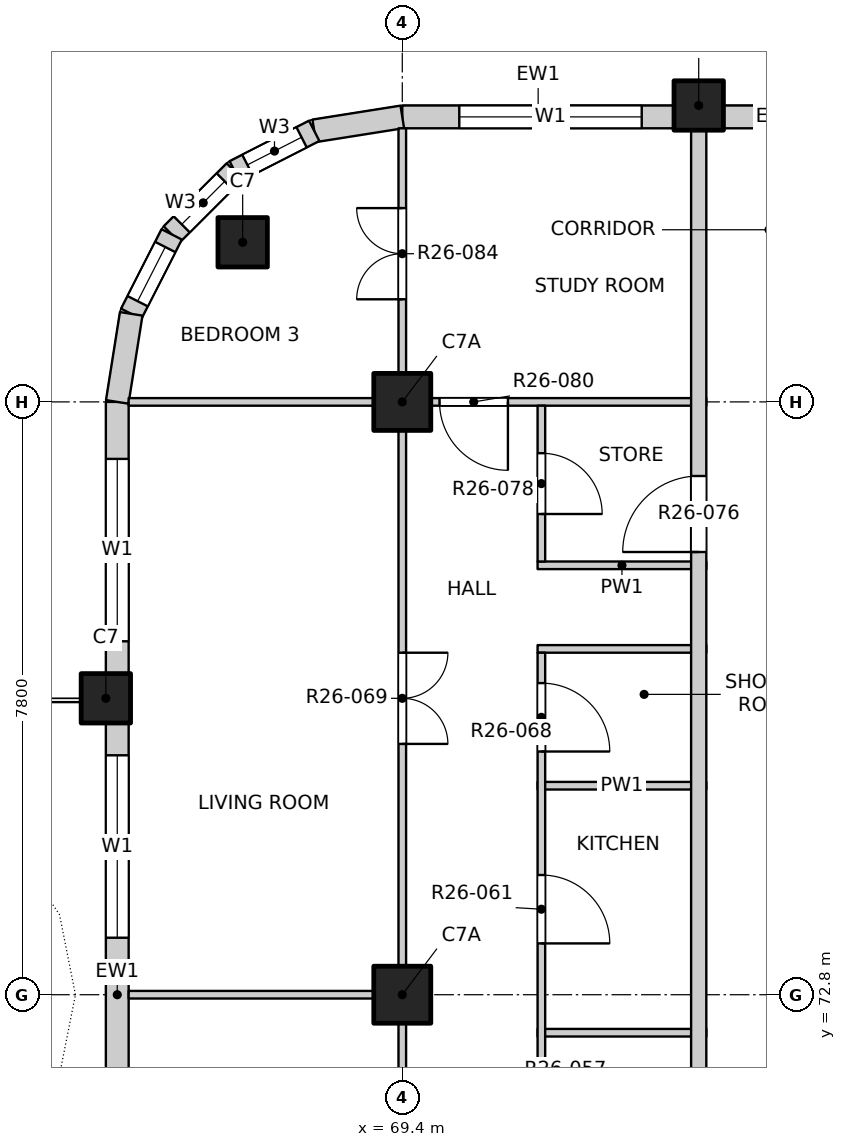
"""IFC4 building model, lengths in metres.
Left out: names, types, materials, properties, quantities, classifications, styles, units other than length and angle.
Written with IfcOpenShell. Run it as: python <this file> out.ifc"""

import sys

from ifc_helpers import new_model, si_unit, direction, frame, frame_2d, origin, origin_2d, place, context, subcontext, project, spatial, rectangle, extrude, element, fill, save


model = new_model("IFC4")
c1 = context("Model", 3, precision=1e-05, world=origin(), true_north=direction((0.0, 1.0)))
c2 = subcontext(c1, "Body", "Model", "MODEL_VIEW")
j1 = project(units=[si_unit("LENGTHUNIT", "METRE"), si_unit("PLANEANGLEUNIT", "RADIAN")], contexts=[c1])
p1 = place(None, origin())
s1 = spatial("IfcSite", under=j1, at=p1, CompositionType="ELEMENT")
p2 = place(p1, origin())
s2 = spatial("IfcBuilding", under=s1, at=p2, CompositionType="ELEMENT")
p3 = place(p2, frame((0.0, 0.0, 259.6)))
s3 = spatial("IfcBuildingStorey", under=s2, at=p3, CompositionType="ELEMENT", Elevation=259.6)
for number, where, z_axis, x_axis in (
    (1, (67.3, 82.7, -0.25), (0.0, 0.0, 1.0), (1.0, 0.0, 0.0)),
    (2, (73.3, 84.5, -0.25), (0.0, 0.0, 1.0), (1.0, 0.0, 0.0)),
    (3, (65.5, 76.7, -0.25), (0.0, 0.0, 1.0), (1.0, 0.0, 0.0)),
):
    element("IfcColumn", number, at=place(p3, frame(where, z_axis=z_axis, x_axis=x_axis)), inside=s3, PredefinedType="COLUMN", context=c2, shape_type="SweptSolid", body=[
        extrude(rectangle(XDim=0.65, YDim=0.65, at=origin_2d()), origin(), (0.0, 0.0, 1.0), 3.4),
    ])
for number, where, z_axis, x_axis in (
    (4, (69.4, 72.8, -0.25), (0.0, 0.0, 1.0), (1.0, 0.0, 0.0)),
    (5, (69.4, 80.6, -0.25), (0.0, 0.0, 1.0), (1.0, 0.0, 0.0)),
):
    element("IfcColumn", number, at=place(p3, frame(where, z_axis=z_axis, x_axis=x_axis)), inside=s3, PredefinedType="COLUMN", context=c2, shape_type="SweptSolid", body=[
        extrude(rectangle(XDim=0.75, YDim=0.75, at=origin_2d()), origin(), (0.0, 0.0, 1.0), 3.4),
    ])
p4 = place(p3, frame((69.4, 84.35, 0.0), z_axis=(0.0, 0.0, 1.0), x_axis=(1.0, 0.0, 0.0)))
e6 = element("IfcWall", 6, at=p4, inside=s3, PredefinedType="SOLIDWALL", context=c2, shape_type="SweptSolid", body=[
    extrude(rectangle(XDim=3.575, YDim=0.3, at=frame_2d((1.788, 0.0))), origin(), (0.0, 0.0, 1.0), 3.15),
])
p5 = place(p4, frame((0.75, 0.0, 0.9)))
e7 = element("IfcOpeningElement", 7, at=p5, cuts=e6, PredefinedType="OPENING", context=c2, shape_type="SweptSolid", body=[
    extrude(rectangle(XDim=2.4, YDim=1.8, at=frame_2d((1.2, 0.9))), frame((0.0, 0.16, 0.0), z_axis=(0.0, -1.0, 0.0), x_axis=(1.0, 0.0, 0.0)), (0.0, 0.0, 1.0), 0.32),
])
p6 = place(p3, frame((73.625, 84.35, 0.0), z_axis=(0.0, 0.0, 1.0), x_axis=(1.0, 0.0, 0.0)))
e8 = element("IfcWall", 8, at=p6, inside=s3, PredefinedType="SOLIDWALL", context=c2, shape_type="SweptSolid", body=[
    extrude(rectangle(XDim=1.425, YDim=0.3, at=frame_2d((0.712, 0.0))), origin(), (0.0, 0.0, 1.0), 3.15),
])
p7 = place(p3, frame((65.65, 69.225, 0.0), z_axis=(0.0, 0.0, 1.0), x_axis=(0.0, 1.0, 0.0)))
e9 = element("IfcWall", 9, at=p7, inside=s3, PredefinedType="SOLIDWALL", context=c2, shape_type="SweptSolid", body=[
    extrude(rectangle(XDim=7.15, YDim=0.3, at=frame_2d((3.575, 0.0))), origin(), (0.0, 0.0, 1.0), 3.15),
])
p8 = place(p7, frame((0.725, 0.0, 0.0)))
e10 = element("IfcOpeningElement", 10, at=p8, cuts=e9, PredefinedType="OPENING", context=c2, shape_type="SweptSolid", body=[
    extrude(rectangle(XDim=1.8, YDim=2.4, at=frame_2d((0.9, 1.2))), frame((0.0, 0.16, 0.0), z_axis=(0.0, -1.0, 0.0), x_axis=(1.0, 0.0, 0.0)), (0.0, 0.0, 1.0), 0.32),
])
p9 = place(p7, frame((4.325, 0.0, 0.9)))
e11 = element("IfcOpeningElement", 11, at=p9, cuts=e9, PredefinedType="OPENING", context=c2, shape_type="SweptSolid", body=[
    extrude(rectangle(XDim=2.4, YDim=1.8, at=frame_2d((1.2, 0.9))), frame((0.0, 0.16, 0.0), z_axis=(0.0, -1.0, 0.0), x_axis=(1.0, 0.0, 0.0)), (0.0, 0.0, 1.0), 0.32),
])
p10 = place(p3, frame((65.65, 77.025, 0.0), z_axis=(0.0, 0.0, 1.0), x_axis=(0.0, 1.0, 0.0)))
e12 = element("IfcWall", 12, at=p10, inside=s3, PredefinedType="SOLIDWALL", context=c2, shape_type="SweptSolid", body=[
    extrude(rectangle(XDim=3.575, YDim=0.3, at=frame_2d((1.788, 0.0))), origin(), (0.0, 0.0, 1.0), 3.15),
])
p11 = place(p10, frame((0.425, 0.0, 0.9)))
e13 = element("IfcOpeningElement", 13, at=p11, cuts=e12, PredefinedType="OPENING", context=c2, shape_type="SweptSolid", body=[
    extrude(rectangle(XDim=2.4, YDim=1.8, at=frame_2d((1.2, 0.9))), frame((0.0, 0.16, 0.0), z_axis=(0.0, -1.0, 0.0), x_axis=(1.0, 0.0, 0.0)), (0.0, 0.0, 1.0), 0.32),
])
p12 = place(p3, frame((69.4, 84.35, 0.0), z_axis=(0.0, 0.0, 1.0), x_axis=(-0.987678452879, -0.156496880861, 0.0)))
e14 = element("IfcWall", 14, at=p12, inside=s3, PredefinedType="SOLIDWALL", context=c2, shape_type="SweptSolid", body=[
    extrude(rectangle(XDim=1.173, YDim=0.3, at=frame_2d((0.586, 0.0))), origin(), (0.0, 0.0, 1.0), 3.15),
])
p13 = place(p3, frame((68.241, 84.167, 0.0), z_axis=(0.0, 0.0, 1.0), x_axis=(-0.890988677504, -0.454025524128, 0.0)))
e15 = element("IfcWall", 15, at=p13, inside=s3, PredefinedType="SOLIDWALL", context=c2, shape_type="SweptSolid", body=[
    extrude(rectangle(XDim=1.173, YDim=0.3, at=frame_2d((0.587, 0.0))), origin(), (0.0, 0.0, 1.0), 3.15),
])
p14 = place(p13, frame((0.187, 0.0, 0.9)))
e16 = element("IfcOpeningElement", 16, at=p14, cuts=e15, PredefinedType="OPENING", context=c2, shape_type="SweptSolid", body=[
    extrude(rectangle(XDim=0.8, YDim=1.2, at=frame_2d((0.4, 0.6))), frame((0.0, 0.16, 0.0), z_axis=(0.0, -1.0, 0.0), x_axis=(1.0, 0.0, 0.0)), (0.0, 0.0, 1.0), 0.32),
])
p15 = place(p3, frame((67.196, 83.634, 0.0), z_axis=(0.0, 0.0, 1.0), x_axis=(-0.707106781187, -0.707106781187, 0.0)))
e17 = element("IfcWall", 17, at=p15, inside=s3, PredefinedType="SOLIDWALL", context=c2, shape_type="SweptSolid", body=[
    extrude(rectangle(XDim=1.173, YDim=0.3, at=frame_2d((0.586, 0.0))), origin(), (0.0, 0.0, 1.0), 3.15),
])
p16 = place(p15, frame((0.187, 0.0, 0.9)))
e18 = element("IfcOpeningElement", 18, at=p16, cuts=e17, PredefinedType="OPENING", context=c2, shape_type="SweptSolid", body=[
    extrude(rectangle(XDim=0.8, YDim=1.2, at=frame_2d((0.4, 0.6))), frame((0.0, 0.16, 0.0), z_axis=(0.0, -1.0, 0.0), x_axis=(1.0, 0.0, 0.0)), (0.0, 0.0, 1.0), 0.32),
])
p17 = place(p3, frame((66.366, 82.804, 0.0), z_axis=(0.0, 0.0, 1.0), x_axis=(-0.454025524128, -0.890988677504, 0.0)))
e19 = element("IfcWall", 19, at=p17, inside=s3, PredefinedType="SOLIDWALL", context=c2, shape_type="SweptSolid", body=[
    extrude(rectangle(XDim=1.173, YDim=0.3, at=frame_2d((0.587, 0.0))), origin(), (0.0, 0.0, 1.0), 3.15),
])
p18 = place(p17, frame((0.187, 0.0, 0.9)))
e20 = element("IfcOpeningElement", 20, at=p18, cuts=e19, PredefinedType="OPENING", context=c2, shape_type="SweptSolid", body=[
    extrude(rectangle(XDim=0.8, YDim=1.2, at=frame_2d((0.4, 0.6))), frame((0.0, 0.16, 0.0), z_axis=(0.0, -1.0, 0.0), x_axis=(1.0, 0.0, 0.0)), (0.0, 0.0, 1.0), 0.32),
])
p19 = place(p3, frame((65.833, 81.759, 0.0), z_axis=(0.0, 0.0, 1.0), x_axis=(-0.156496880861, -0.987678452879, 0.0)))
e21 = element("IfcWall", 21, at=p19, inside=s3, PredefinedType="SOLIDWALL", context=c2, shape_type="SweptSolid", body=[
    extrude(rectangle(XDim=1.173, YDim=0.3, at=frame_2d((0.586, 0.0))), origin(), (0.0, 0.0, 1.0), 3.15),
])
p20 = place(p3, frame((71.18, 72.3, 0.0), z_axis=(0.0, 0.0, 1.0), x_axis=(1.0, 0.0, 0.0)))
e22 = element("IfcWall", 22, at=p20, inside=s3, PredefinedType="PARTITIONING", context=c2, shape_type="SweptSolid", body=[
    extrude(rectangle(XDim=2.22, YDim=0.1, at=frame_2d((1.11, 0.0))), origin(), (0.0, 0.0, 1.0), 3.15),
])
p21 = place(p3, frame((65.8, 72.8, 0.0), z_axis=(0.0, 0.0, 1.0), x_axis=(1.0, 0.0, 0.0)))
e23 = element("IfcWall", 23, at=p21, inside=s3, PredefinedType="PARTITIONING", context=c2, shape_type="SweptSolid", body=[
    extrude(rectangle(XDim=3.65, YDim=0.1, at=frame_2d((1.825, 0.0))), origin(), (0.0, 0.0, 1.0), 3.15),
])
for number, where, z_axis, x_axis in (
    (24, (71.18, 75.55, 0.0), (0.0, 0.0, 1.0), (1.0, 0.0, 0.0)),
    (25, (71.18, 77.35, 0.0), (0.0, 0.0, 1.0), (1.0, 0.0, 0.0)),
    (26, (71.18, 78.45, 0.0), (0.0, 0.0, 1.0), (1.0, 0.0, 0.0)),
):
    element("IfcWall", number, at=place(p3, frame(where, z_axis=z_axis, x_axis=x_axis)), inside=s3, PredefinedType="PARTITIONING", context=c2, shape_type="SweptSolid", body=[
        extrude(rectangle(XDim=2.22, YDim=0.1, at=frame_2d((1.11, 0.0))), origin(), (0.0, 0.0, 1.0), 3.15),
    ])
p22 = place(p3, frame((65.8, 80.6, 0.0), z_axis=(0.0, 0.0, 1.0), x_axis=(1.0, 0.0, 0.0)))
e27 = element("IfcWall", 27, at=p22, inside=s3, PredefinedType="PARTITIONING", context=c2, shape_type="SweptSolid", body=[
    extrude(rectangle(XDim=7.6, YDim=0.1, at=frame_2d((3.8, 0.0))), origin(), (0.0, 0.0, 1.0), 3.15),
])
p23 = place(p22, frame((4.09, 0.0, 0.0)))
e28 = element("IfcOpeningElement", 28, at=p23, cuts=e27, PredefinedType="OPENING", context=c2, shape_type="SweptSolid", body=[
    extrude(rectangle(XDim=0.9, YDim=2.1, at=frame_2d((0.45, 1.05))), frame((0.0, 0.06, 0.0), z_axis=(0.0, -1.0, 0.0), x_axis=(1.0, 0.0, 0.0)), (0.0, 0.0, 1.0), 0.12),
])
p24 = place(p3, frame((69.4, 45.8, 0.0), z_axis=(0.0, 0.0, 1.0), x_axis=(0.0, 1.0, 0.0)))
e29 = element("IfcWall", 29, at=p24, inside=s3, PredefinedType="PARTITIONING", context=c2, shape_type="SweptSolid", body=[
    extrude(rectangle(XDim=38.4, YDim=0.1, at=frame_2d((19.2, 0.0))), origin(), (0.0, 0.0, 1.0), 3.15),
])
p25 = place(p24, frame((1.05, 0.0, 0.0)))
e30 = element("IfcOpeningElement", 30, at=p25, cuts=e29, PredefinedType="OPENING", context=c2, shape_type="SweptSolid", body=[
    extrude(rectangle(XDim=1.2, YDim=2.1, at=frame_2d((0.6, 1.05))), frame((0.0, 0.06, 0.0), z_axis=(0.0, -1.0, 0.0), x_axis=(1.0, 0.0, 0.0)), (0.0, 0.0, 1.0), 0.12),
])
p26 = place(p24, frame((5.1, 0.0, 0.0)))
e31 = element("IfcOpeningElement", 31, at=p26, cuts=e29, PredefinedType="OPENING", context=c2, shape_type="SweptSolid", body=[
    extrude(rectangle(XDim=0.9, YDim=2.1, at=frame_2d((0.45, 1.05))), frame((0.0, 0.06, 0.0), z_axis=(0.0, -1.0, 0.0), x_axis=(1.0, 0.0, 0.0)), (0.0, 0.0, 1.0), 0.12),
])
p27 = place(p24, frame((9.0, 0.0, 0.0)))
e32 = element("IfcOpeningElement", 32, at=p27, cuts=e29, PredefinedType="OPENING", context=c2, shape_type="SweptSolid", body=[
    extrude(rectangle(XDim=0.9, YDim=2.1, at=frame_2d((0.45, 1.05))), frame((0.0, 0.06, 0.0), z_axis=(0.0, -1.0, 0.0), x_axis=(1.0, 0.0, 0.0)), (0.0, 0.0, 1.0), 0.12),
])
p28 = place(p24, frame((12.9, 0.0, 0.0)))
e33 = element("IfcOpeningElement", 33, at=p28, cuts=e29, PredefinedType="OPENING", context=c2, shape_type="SweptSolid", body=[
    extrude(rectangle(XDim=0.9, YDim=2.1, at=frame_2d((0.45, 1.05))), frame((0.0, 0.06, 0.0), z_axis=(0.0, -1.0, 0.0), x_axis=(1.0, 0.0, 0.0)), (0.0, 0.0, 1.0), 0.12),
])
p29 = place(p24, frame((16.8, 0.0, 0.0)))
e34 = element("IfcOpeningElement", 34, at=p29, cuts=e29, PredefinedType="OPENING", context=c2, shape_type="SweptSolid", body=[
    extrude(rectangle(XDim=0.9, YDim=2.1, at=frame_2d((0.45, 1.05))), frame((0.0, 0.06, 0.0), z_axis=(0.0, -1.0, 0.0), x_axis=(1.0, 0.0, 0.0)), (0.0, 0.0, 1.0), 0.12),
])
p30 = place(p24, frame((20.7, 0.0, 0.0)))
e35 = element("IfcOpeningElement", 35, at=p30, cuts=e29, PredefinedType="OPENING", context=c2, shape_type="SweptSolid", body=[
    extrude(rectangle(XDim=0.9, YDim=2.1, at=frame_2d((0.45, 1.05))), frame((0.0, 0.06, 0.0), z_axis=(0.0, -1.0, 0.0), x_axis=(1.0, 0.0, 0.0)), (0.0, 0.0, 1.0), 0.12),
])
p31 = place(p24, frame((24.6, 0.0, 0.0)))
e36 = element("IfcOpeningElement", 36, at=p31, cuts=e29, PredefinedType="OPENING", context=c2, shape_type="SweptSolid", body=[
    extrude(rectangle(XDim=0.9, YDim=2.1, at=frame_2d((0.45, 1.05))), frame((0.0, 0.06, 0.0), z_axis=(0.0, -1.0, 0.0), x_axis=(1.0, 0.0, 0.0)), (0.0, 0.0, 1.0), 0.12),
])
p32 = place(p24, frame((30.3, 0.0, 0.0)))
e37 = element("IfcOpeningElement", 37, at=p32, cuts=e29, PredefinedType="OPENING", context=c2, shape_type="SweptSolid", body=[
    extrude(rectangle(XDim=1.2, YDim=2.1, at=frame_2d((0.6, 1.05))), frame((0.0, 0.06, 0.0), z_axis=(0.0, -1.0, 0.0), x_axis=(1.0, 0.0, 0.0)), (0.0, 0.0, 1.0), 0.12),
])
p33 = place(p24, frame((36.15, 0.0, 0.0)))
e38 = element("IfcOpeningElement", 38, at=p33, cuts=e29, PredefinedType="OPENING", context=c2, shape_type="SweptSolid", body=[
    extrude(rectangle(XDim=1.2, YDim=2.1, at=frame_2d((0.6, 1.05))), frame((0.0, 0.06, 0.0), z_axis=(0.0, -1.0, 0.0), x_axis=(1.0, 0.0, 0.0)), (0.0, 0.0, 1.0), 0.12),
])
p34 = place(p3, frame((71.23, 60.65, 0.0), z_axis=(0.0, 0.0, 1.0), x_axis=(0.0, 1.0, 0.0)))
e39 = element("IfcWall", 39, at=p34, inside=s3, PredefinedType="PARTITIONING", context=c2, shape_type="SweptSolid", body=[
    extrude(rectangle(XDim=16.65, YDim=0.1, at=frame_2d((8.325, 0.0))), origin(), (0.0, 0.0, 1.0), 3.15),
])
p35 = place(p34, frame((0.625, 0.0, 0.0)))
e40 = element("IfcOpeningElement", 40, at=p35, cuts=e39, PredefinedType="OPENING", context=c2, shape_type="SweptSolid", body=[
    extrude(rectangle(XDim=0.8, YDim=2.1, at=frame_2d((0.4, 1.05))), frame((0.0, 0.06, 0.0), z_axis=(0.0, -1.0, 0.0), x_axis=(1.0, 0.0, 0.0)), (0.0, 0.0, 1.0), 0.12),
])
p36 = place(p34, frame((2.825, 0.0, 0.0)))
e41 = element("IfcOpeningElement", 41, at=p36, cuts=e39, PredefinedType="OPENING", context=c2, shape_type="SweptSolid", body=[
    extrude(rectangle(XDim=0.8, YDim=2.1, at=frame_2d((0.4, 1.05))), frame((0.0, 0.06, 0.0), z_axis=(0.0, -1.0, 0.0), x_axis=(1.0, 0.0, 0.0)), (0.0, 0.0, 1.0), 0.12),
])
p37 = place(p34, frame((5.25, 0.0, 0.0)))
e42 = element("IfcOpeningElement", 42, at=p37, cuts=e39, PredefinedType="OPENING", context=c2, shape_type="SweptSolid", body=[
    extrude(rectangle(XDim=0.8, YDim=2.1, at=frame_2d((0.4, 1.05))), frame((0.0, 0.06, 0.0), z_axis=(0.0, -1.0, 0.0), x_axis=(1.0, 0.0, 0.0)), (0.0, 0.0, 1.0), 0.12),
])
p38 = place(p34, frame((7.7, 0.0, 0.0)))
e43 = element("IfcOpeningElement", 43, at=p38, cuts=e39, PredefinedType="OPENING", context=c2, shape_type="SweptSolid", body=[
    extrude(rectangle(XDim=0.8, YDim=2.1, at=frame_2d((0.4, 1.05))), frame((0.0, 0.06, 0.0), z_axis=(0.0, -1.0, 0.0), x_axis=(1.0, 0.0, 0.0)), (0.0, 0.0, 1.0), 0.12),
])
p39 = place(p34, frame((10.0, 0.0, 0.0)))
e44 = element("IfcOpeningElement", 44, at=p39, cuts=e39, PredefinedType="OPENING", context=c2, shape_type="SweptSolid", body=[
    extrude(rectangle(XDim=0.9, YDim=2.1, at=frame_2d((0.45, 1.05))), frame((0.0, 0.06, 0.0), z_axis=(0.0, -1.0, 0.0), x_axis=(1.0, 0.0, 0.0)), (0.0, 0.0, 1.0), 0.12),
])
p40 = place(p34, frame((12.825, 0.0, 0.0)))
e45 = element("IfcOpeningElement", 45, at=p40, cuts=e39, PredefinedType="OPENING", context=c2, shape_type="SweptSolid", body=[
    extrude(rectangle(XDim=0.9, YDim=2.1, at=frame_2d((0.45, 1.05))), frame((0.0, 0.06, 0.0), z_axis=(0.0, -1.0, 0.0), x_axis=(1.0, 0.0, 0.0)), (0.0, 0.0, 1.0), 0.12),
])
p41 = place(p34, frame((15.35, 0.0, 0.0)))
e46 = element("IfcOpeningElement", 46, at=p41, cuts=e39, PredefinedType="OPENING", context=c2, shape_type="SweptSolid", body=[
    extrude(rectangle(XDim=0.9, YDim=2.1, at=frame_2d((0.45, 1.05))), frame((0.0, 0.06, 0.0), z_axis=(0.0, -1.0, 0.0), x_axis=(1.0, 0.0, 0.0)), (0.0, 0.0, 1.0), 0.12),
])
p42 = place(p3, frame((71.23, 78.5, 0.0), z_axis=(0.0, 0.0, 1.0), x_axis=(0.0, 1.0, 0.0)))
e47 = element("IfcWall", 47, at=p42, inside=s3, PredefinedType="PARTITIONING", context=c2, shape_type="SweptSolid", body=[
    extrude(rectangle(XDim=2.05, YDim=0.1, at=frame_2d((1.025, 0.0))), origin(), (0.0, 0.0, 1.0), 3.15),
])
p43 = place(p42, frame((0.625, 0.0, 0.0)))
e48 = element("IfcOpeningElement", 48, at=p43, cuts=e47, PredefinedType="OPENING", context=c2, shape_type="SweptSolid", body=[
    extrude(rectangle(XDim=0.8, YDim=2.1, at=frame_2d((0.4, 1.05))), frame((0.0, 0.06, 0.0), z_axis=(0.0, -1.0, 0.0), x_axis=(1.0, 0.0, 0.0)), (0.0, 0.0, 1.0), 0.12),
])
p44 = place(p3, frame((73.3, 49.5, 0.0), z_axis=(0.0, 0.0, 1.0), x_axis=(0.0, 1.0, 0.0)))
e49 = element("IfcWall", 49, at=p44, inside=s3, PredefinedType="PARTITIONING", context=c2, shape_type="SweptSolid", body=[
    extrude(rectangle(XDim=34.7, YDim=0.2, at=frame_2d((17.35, 0.0))), origin(), (0.0, 0.0, 1.0), 3.15),
])
p45 = place(p44, frame((11.275, 0.0, 0.0)))
e50 = element("IfcOpeningElement", 50, at=p45, cuts=e49, PredefinedType="OPENING", context=c2, shape_type="SweptSolid", body=[
    extrude(rectangle(XDim=1.0, YDim=2.1, at=frame_2d((0.5, 1.05))), frame((0.0, 0.11, 0.0), z_axis=(0.0, -1.0, 0.0), x_axis=(1.0, 0.0, 0.0)), (0.0, 0.0, 1.0), 0.22),
])
p46 = place(p44, frame((29.125, 0.0, 0.0)))
e51 = element("IfcOpeningElement", 51, at=p46, cuts=e49, PredefinedType="OPENING", context=c2, shape_type="SweptSolid", body=[
    extrude(rectangle(XDim=1.0, YDim=2.1, at=frame_2d((0.5, 1.05))), frame((0.0, 0.11, 0.0), z_axis=(0.0, -1.0, 0.0), x_axis=(1.0, 0.0, 0.0)), (0.0, 0.0, 1.0), 0.22),
])
p47 = place(p5, origin())
e52 = element("IfcWindow", 52, at=p47, inside=s3, PartitioningType="DOUBLE_PANEL_VERTICAL", PredefinedType="WINDOW", context=c2, shape_type="SweptSolid", body=[
    extrude(rectangle(XDim=2.4, YDim=1.8, at=frame_2d((1.2, 0.9))), frame((0.0, 0.03, 0.0), z_axis=(0.0, -1.0, 0.0), x_axis=(1.0, 0.0, 0.0)), (0.0, 0.0, 1.0), 0.06),
])
fill(e7, e52)
p48 = place(p9, origin())
e53 = element("IfcWindow", 53, at=p48, inside=s3, PartitioningType="DOUBLE_PANEL_VERTICAL", PredefinedType="WINDOW", context=c2, shape_type="SweptSolid", body=[
    extrude(rectangle(XDim=2.4, YDim=1.8, at=frame_2d((1.2, 0.9))), frame((0.0, 0.03, 0.0), z_axis=(0.0, -1.0, 0.0), x_axis=(1.0, 0.0, 0.0)), (0.0, 0.0, 1.0), 0.06),
])
fill(e11, e53)
p49 = place(p11, origin())
e54 = element("IfcWindow", 54, at=p49, inside=s3, PartitioningType="DOUBLE_PANEL_VERTICAL", PredefinedType="WINDOW", context=c2, shape_type="SweptSolid", body=[
    extrude(rectangle(XDim=2.4, YDim=1.8, at=frame_2d((1.2, 0.9))), frame((0.0, 0.03, 0.0), z_axis=(0.0, -1.0, 0.0), x_axis=(1.0, 0.0, 0.0)), (0.0, 0.0, 1.0), 0.06),
])
fill(e13, e54)
p50 = place(p14, origin())
e55 = element("IfcWindow", 55, at=p50, inside=s3, PartitioningType="SINGLE_PANEL", PredefinedType="WINDOW", context=c2, shape_type="SweptSolid", body=[
    extrude(rectangle(XDim=0.8, YDim=1.2, at=frame_2d((0.4, 0.6))), frame((0.0, 0.03, 0.0), z_axis=(0.0, -1.0, 0.0), x_axis=(1.0, 0.0, 0.0)), (0.0, 0.0, 1.0), 0.06),
])
fill(e16, e55)
p51 = place(p16, origin())
e56 = element("IfcWindow", 56, at=p51, inside=s3, PartitioningType="SINGLE_PANEL", PredefinedType="WINDOW", context=c2, shape_type="SweptSolid", body=[
    extrude(rectangle(XDim=0.8, YDim=1.2, at=frame_2d((0.4, 0.6))), frame((0.0, 0.03, 0.0), z_axis=(0.0, -1.0, 0.0), x_axis=(1.0, 0.0, 0.0)), (0.0, 0.0, 1.0), 0.06),
])
fill(e18, e56)
p52 = place(p18, origin())
e57 = element("IfcWindow", 57, at=p52, inside=s3, PartitioningType="SINGLE_PANEL", PredefinedType="WINDOW", context=c2, shape_type="SweptSolid", body=[
    extrude(rectangle(XDim=0.8, YDim=1.2, at=frame_2d((0.4, 0.6))), frame((0.0, 0.03, 0.0), z_axis=(0.0, -1.0, 0.0), x_axis=(1.0, 0.0, 0.0)), (0.0, 0.0, 1.0), 0.06),
])
fill(e20, e57)
p53 = place(p40, origin())
e58 = element("IfcDoor", 58, at=p53, inside=s3, OperationType="SINGLE_SWING_RIGHT", PredefinedType="DOOR", context=c2, shape_type="SweptSolid", body=[
    extrude(rectangle(XDim=0.9, YDim=2.1, at=frame_2d((0.45, 1.05))), frame((0.0, 0.025, 0.0), z_axis=(0.0, -1.0, 0.0), x_axis=(1.0, 0.0, 0.0)), (0.0, 0.0, 1.0), 0.05),
])
fill(e45, e58)
p54 = place(p41, origin())
e59 = element("IfcDoor", 59, at=p54, inside=s3, OperationType="SINGLE_SWING_RIGHT", PredefinedType="DOOR", context=c2, shape_type="SweptSolid", body=[
    extrude(rectangle(XDim=0.9, YDim=2.1, at=frame_2d((0.45, 1.05))), frame((0.0, 0.025, 0.0), z_axis=(0.0, -1.0, 0.0), x_axis=(1.0, 0.0, 0.0)), (0.0, 0.0, 1.0), 0.05),
])
fill(e46, e59)
p55 = place(p32, origin())
e60 = element("IfcDoor", 60, at=p55, inside=s3, OperationType="DOUBLE_DOOR_SINGLE_SWING", PredefinedType="DOOR", context=c2, shape_type="SweptSolid", body=[
    extrude(rectangle(XDim=1.2, YDim=2.1, at=frame_2d((0.6, 1.05))), frame((0.0, 0.025, 0.0), z_axis=(0.0, -1.0, 0.0), x_axis=(1.0, 0.0, 0.0)), (0.0, 0.0, 1.0), 0.05),
])
fill(e37, e60)
p56 = place(p46, origin())
e61 = element("IfcDoor", 61, at=p56, inside=s3, OperationType="SINGLE_SWING_RIGHT", PredefinedType="DOOR", context=c2, shape_type="SweptSolid", body=[
    extrude(rectangle(XDim=1.0, YDim=2.1, at=frame_2d((0.5, 1.05))), frame((0.0, 0.025, 0.0), z_axis=(0.0, -1.0, 0.0), x_axis=(1.0, 0.0, 0.0)), (0.0, 0.0, 1.0), 0.05),
])
fill(e51, e61)
p57 = place(p43, origin())
e62 = element("IfcDoor", 62, at=p57, inside=s3, OperationType="SINGLE_SWING_RIGHT", PredefinedType="DOOR", context=c2, shape_type="SweptSolid", body=[
    extrude(rectangle(XDim=0.8, YDim=2.1, at=frame_2d((0.4, 1.05))), frame((0.0, 0.025, 0.0), z_axis=(0.0, -1.0, 0.0), x_axis=(1.0, 0.0, 0.0)), (0.0, 0.0, 1.0), 0.05),
])
fill(e48, e62)
p58 = place(p23, origin())
e63 = element("IfcDoor", 63, at=p58, inside=s3, OperationType="SINGLE_SWING_LEFT", PredefinedType="DOOR", context=c2, shape_type="SweptSolid", body=[
    extrude(rectangle(XDim=0.9, YDim=2.1, at=frame_2d((0.45, 1.05))), frame((0.0, 0.025, 0.0), z_axis=(0.0, -1.0, 0.0), x_axis=(1.0, 0.0, 0.0)), (0.0, 0.0, 1.0), 0.05),
])
fill(e28, e63)
p59 = place(p33, origin())
e64 = element("IfcDoor", 64, at=p59, inside=s3, OperationType="DOUBLE_DOOR_SINGLE_SWING", PredefinedType="DOOR", context=c2, shape_type="SweptSolid", body=[
    extrude(rectangle(XDim=1.2, YDim=2.1, at=frame_2d((0.6, 1.05))), frame((0.0, 0.025, 0.0), z_axis=(0.0, -1.0, 0.0), x_axis=(1.0, 0.0, 0.0)), (0.0, 0.0, 1.0), 0.05),
])
fill(e38, e64)
save(model, sys.argv[1])
